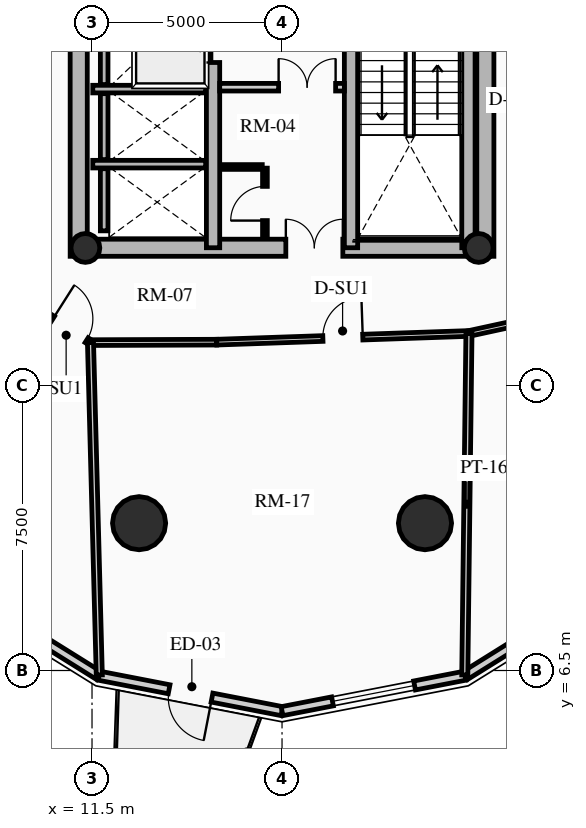
"""IFC4 building model, lengths in metres.
Left out: names, types, materials, properties, quantities, classifications, styles, units other than length and angle.
Written with IfcOpenShell. Run it as: python <this file> out.ifc"""

import sys

from ifc_helpers import new_model, si_unit, direction, frame, frame_2d, origin, origin_2d, place, context, subcontext, project, spatial, rectangle, circle, hollow_circle, extrude, source, transform, mapped, element, fill, save


model = new_model("IFC4")
c1 = context("Model", 3, precision=1e-05, world=origin(), true_north=direction((0.0, 1.0)))
c2 = subcontext(c1, "Body", "Model", "MODEL_VIEW")
j1 = project(units=[si_unit("LENGTHUNIT", "METRE"), si_unit("PLANEANGLEUNIT", "RADIAN")], contexts=[c1])
p1 = place(None, origin())
s1 = spatial("IfcSite", under=j1, at=p1, CompositionType="ELEMENT")
p2 = place(p1, origin())
s2 = spatial("IfcBuilding", under=s1, at=p2, CompositionType="ELEMENT")
p3 = place(p2, frame((0.0, 0.0, 78.88)))
s3 = spatial("IfcBuildingStorey", under=s2, at=p3, CompositionType="ELEMENT", Elevation=78.88)
for number, where, z_axis, x_axis in (
    (1, (11.15, 17.4, 0.0), (0.0, 0.0, 1.0), (0.0, 1.0, 0.0)),
    (2, (21.85, 17.4, 0.0), (0.0, 0.0, 1.0), (0.0, 1.0, 0.0)),
):
    element("IfcWall", number, at=place(p3, frame(where, z_axis=z_axis, x_axis=x_axis)), inside=s3, PredefinedType="SHEAR", context=c2, shape_type="SweptSolid", body=[
        extrude(rectangle(XDim=14.2, YDim=0.45, at=frame_2d((7.1, 0.0))), origin(), (0.0, 0.0, 1.0), 2.91),
    ])
p4 = place(p3, frame((11.15, 17.625, 0.0), z_axis=(0.0, 0.0, 1.0), x_axis=(1.0, 0.0, 0.0)))
e3 = element("IfcWall", 3, at=p4, inside=s3, PredefinedType="SHEAR", context=c2, shape_type="SweptSolid", body=[
    extrude(rectangle(XDim=10.7, YDim=0.45, at=frame_2d((5.35, 0.0))), origin(), (0.0, 0.0, 1.0), 2.91),
])
m1 = source(origin(), c2, "Body", "SweptSolid", [
    extrude(rectangle(XDim=1.5, YDim=2.02, at=frame_2d((0.75, 1.01))), frame((0.0, 0.235, 0.0), z_axis=(0.0, -1.0, 0.0), x_axis=(1.0, 0.0, 0.0)), (0.0, 0.0, 1.0), 0.47),
])
p5 = place(p4, frame((5.45, 0.0, 0.0)))
e4 = element("IfcOpeningElement", 4, at=p5, cuts=e3, PredefinedType="OPENING", context=c2, shape_type="MappedRepresentation", body=[
    mapped(m1, transform((0.0, 0.0, 0.0), x_axis=(1.0, 0.0, 0.0), y_axis=(0.0, 1.0, 0.0), z_axis=(0.0, 0.0, 1.0), scale=1.0)),
])
p6 = place(p3, frame((14.685, 17.625, 0.0), z_axis=(0.0, 0.0, 1.0), x_axis=(0.0, 1.0, 0.0)))
e5 = element("IfcWall", 5, at=p6, inside=s3, PredefinedType="SHEAR", context=c2, shape_type="SweptSolid", body=[
    extrude(rectangle(XDim=13.75, YDim=0.35, at=frame_2d((6.875, 0.0))), origin(), (0.0, 0.0, 1.0), 2.91),
])
m2 = source(origin(), c2, "Body", "SweptSolid", [
    extrude(rectangle(XDim=1.1, YDim=2.015, at=frame_2d((0.55, 1.007))), frame((0.0, 0.185, 0.0), z_axis=(0.0, -1.0, 0.0), x_axis=(1.0, 0.0, 0.0)), (0.0, 0.0, 1.0), 0.37),
])
p7 = place(p6, frame((4.875, 0.0, 0.0)))
e6 = element("IfcOpeningElement", 6, at=p7, cuts=e5, PredefinedType="OPENING", context=c2, shape_type="MappedRepresentation", body=[
    mapped(m2, transform((0.0, 0.0, 0.0), x_axis=(1.0, 0.0, 0.0), y_axis=(0.0, 1.0, 0.0), z_axis=(0.0, 0.0, 1.0), scale=1.0)),
])
m3 = source(origin(), c2, "Body", "SweptSolid", [
    extrude(rectangle(XDim=1.15, YDim=2.02, at=frame_2d((0.575, 1.01))), frame((0.0, 0.185, 0.0), z_axis=(0.0, -1.0, 0.0), x_axis=(1.0, 0.0, 0.0)), (0.0, 0.0, 1.0), 0.37),
])
p8 = place(p6, frame((7.295, 0.0, 0.0)))
e7 = element("IfcOpeningElement", 7, at=p8, cuts=e5, PredefinedType="OPENING", context=c2, shape_type="MappedRepresentation", body=[
    mapped(m3, transform((0.0, 0.0, 0.0), x_axis=(1.0, 0.0, 0.0), y_axis=(0.0, 1.0, 0.0), z_axis=(0.0, 0.0, 1.0), scale=1.0)),
])
p9 = place(p3, frame((18.315, 17.625, 0.0), z_axis=(0.0, 0.0, 1.0), x_axis=(0.0, 1.0, 0.0)))
e8 = element("IfcWall", 8, at=p9, inside=s3, PredefinedType="SHEAR", context=c2, shape_type="SweptSolid", body=[
    extrude(rectangle(XDim=13.75, YDim=0.35, at=frame_2d((6.875, 0.0))), origin(), (0.0, 0.0, 1.0), 2.91),
])
p10 = place(p9, frame((10.0, 0.0, 0.0)))
e9 = element("IfcOpeningElement", 9, at=p10, cuts=e8, PredefinedType="OPENING", context=c2, shape_type="MappedRepresentation", body=[
    mapped(m2, transform((0.0, 0.0, 0.0), x_axis=(1.0, 0.0, 0.0), y_axis=(0.0, 1.0, 0.0), z_axis=(0.0, 0.0, 1.0), scale=1.0)),
])
p11 = place(p9, frame((12.0, 0.0, 0.0)))
e10 = element("IfcOpeningElement", 10, at=p11, cuts=e8, PredefinedType="OPENING", context=c2, shape_type="MappedRepresentation", body=[
    mapped(m2, transform((0.0, 0.0, 0.0), x_axis=(1.0, 0.0, 0.0), y_axis=(0.0, 1.0, 0.0), z_axis=(0.0, 0.0, 1.0), scale=1.0)),
])
p12 = place(p9, frame((5.305, 0.0, 0.0)))
e11 = element("IfcOpeningElement", 11, at=p12, cuts=e8, PredefinedType="OPENING", context=c2, shape_type="MappedRepresentation", body=[
    mapped(m3, transform((0.0, 0.0, 0.0), x_axis=(1.0, 0.0, 0.0), y_axis=(0.0, 1.0, 0.0), z_axis=(0.0, 0.0, 1.0), scale=1.0)),
])
p13 = place(p3, frame((21.405, 17.625, 0.0), z_axis=(0.0, 0.0, 1.0), x_axis=(0.0, 1.0, 0.0)))
e12 = element("IfcWall", 12, at=p13, inside=s3, PredefinedType="SHEAR", context=c2, shape_type="SweptSolid", body=[
    extrude(rectangle(XDim=6.72, YDim=0.35, at=frame_2d((3.36, 0.0))), origin(), (0.0, 0.0, 1.0), 2.91),
])
for number, where, z_axis, x_axis in (
    (13, (11.325, 17.62, 0.0), (0.0, 0.0, 1.0), (1.0, 0.0, 0.0)),
    (14, (21.675, 17.62, 0.0), (0.0, 0.0, 1.0), (1.0, 0.0, 0.0)),
):
    element("IfcColumn", number, at=place(p3, frame(where, z_axis=z_axis, x_axis=x_axis)), inside=s3, PredefinedType="COLUMN", context=c2, shape_type="SweptSolid", body=[
        extrude(hollow_circle(Radius=0.38, WallThickness=0.032, at=origin_2d()), origin(), (0.0, 0.0, 1.0), 2.91),
    ])
for number, where, z_axis, x_axis in (
    (15, (12.739, 10.377, 0.0), (0.0, 0.0, 1.0), (1.0, 0.0, 0.0)),
    (16, (20.261, 10.377, 0.0), (0.0, 0.0, 1.0), (1.0, 0.0, 0.0)),
):
    element("IfcColumn", number, at=place(p3, frame(where, z_axis=z_axis, x_axis=x_axis)), inside=s3, PredefinedType="USERDEFINED", context=c2, shape_type="SweptSolid", body=[
        extrude(circle(Radius=0.7, at=origin_2d()), origin(), (0.0, 0.0, 1.0), 2.91),
    ])
p14 = place(p3, frame((11.685, 6.363, 0.0), z_axis=(0.0, 0.0, 1.0), x_axis=(-0.848520380187, 0.529162701263, 0.0)))
e17 = element("IfcWall", 17, at=p14, inside=s3, PredefinedType="SOLIDWALL", context=c2, shape_type="SweptSolid", body=[
    extrude(rectangle(XDim=5.119, YDim=0.24, at=frame_2d((2.56, 0.0))), origin(), (0.0, 0.0, 1.0), 2.179),
])
m4 = source(origin(), c2, "Body", "SweptSolid", [
    extrude(rectangle(XDim=1.9, YDim=1.35, at=frame_2d((0.95, 0.675))), frame((0.0, 0.13, 0.0), z_axis=(0.0, -1.0, 0.0), x_axis=(1.0, 0.0, 0.0)), (0.0, 0.0, 1.0), 0.26),
])
p15 = place(p14, frame((1.609, 0.0, 0.65)))
e18 = element("IfcOpeningElement", 18, at=p15, cuts=e17, PredefinedType="OPENING", context=c2, shape_type="MappedRepresentation", body=[
    mapped(m4, transform((0.0, 0.0, 0.0), x_axis=(1.0, 0.0, 0.0), y_axis=(0.0, 1.0, 0.0), z_axis=(0.0, 0.0, 1.0), scale=1.0)),
])
p16 = place(p3, frame((16.5, 5.43, 0.0), z_axis=(0.0, 0.0, 1.0), x_axis=(-0.981723785992, 0.190311344954, 0.0)))
e19 = element("IfcWall", 19, at=p16, inside=s3, PredefinedType="SOLIDWALL", context=c2, shape_type="SweptSolid", body=[
    extrude(rectangle(XDim=4.904, YDim=0.24, at=frame_2d((2.452, 0.0))), origin(), (0.0, 0.0, 1.0), 2.179),
])
m5 = source(origin(), c2, "Body", "SweptSolid", [
    extrude(rectangle(XDim=1.15, YDim=2.005, at=frame_2d((0.575, 1.002))), frame((0.0, 0.13, 0.0), z_axis=(0.0, -1.0, 0.0), x_axis=(1.0, 0.0, 0.0)), (0.0, 0.0, 1.0), 0.26),
])
p17 = place(p16, frame((1.877, 0.0, 0.0)))
e20 = element("IfcOpeningElement", 20, at=p17, cuts=e19, PredefinedType="OPENING", context=c2, shape_type="MappedRepresentation", body=[
    mapped(m5, transform((0.0, 0.0, 0.0), x_axis=(1.0, 0.0, 0.0), y_axis=(0.0, 1.0, 0.0), z_axis=(0.0, 0.0, 1.0), scale=1.0)),
])
p18 = place(p3, frame((21.315, 6.363, 0.0), z_axis=(0.0, 0.0, 1.0), x_axis=(-0.981723785992, -0.190311344954, 0.0)))
e21 = element("IfcWall", 21, at=p18, inside=s3, PredefinedType="SOLIDWALL", context=c2, shape_type="SweptSolid", body=[
    extrude(rectangle(XDim=4.904, YDim=0.24, at=frame_2d((2.452, 0.0))), origin(), (0.0, 0.0, 1.0), 2.179),
])
m6 = source(origin(), c2, "Body", "SweptSolid", [
    extrude(rectangle(XDim=2.2, YDim=1.35, at=frame_2d((1.1, 0.675))), frame((0.0, 0.13, 0.0), z_axis=(0.0, -1.0, 0.0), x_axis=(1.0, 0.0, 0.0)), (0.0, 0.0, 1.0), 0.26),
])
p19 = place(p18, frame((1.352, 0.0, 0.65)))
e22 = element("IfcOpeningElement", 22, at=p19, cuts=e21, PredefinedType="OPENING", context=c2, shape_type="MappedRepresentation", body=[
    mapped(m6, transform((0.0, 0.0, 0.0), x_axis=(1.0, 0.0, 0.0), y_axis=(0.0, 1.0, 0.0), z_axis=(0.0, 0.0, 1.0), scale=1.0)),
])
p20 = place(p3, frame((25.658, 9.072, 0.0), z_axis=(0.0, 0.0, 1.0), x_axis=(-0.848520380187, -0.529162701263, 0.0)))
e23 = element("IfcWall", 23, at=p20, inside=s3, PredefinedType="SOLIDWALL", context=c2, shape_type="SweptSolid", body=[
    extrude(rectangle(XDim=5.119, YDim=0.24, at=frame_2d((2.56, 0.0))), origin(), (0.0, 0.0, 1.0), 2.179),
])
p21 = place(p3, frame((11.52, 21.8, 0.0), z_axis=(0.0, 0.0, 1.0), x_axis=(1.0, 0.0, 0.0)))
e24 = element("IfcWall", 24, at=p21, inside=s3, PredefinedType="SHEAR", context=c2, shape_type="SweptSolid", body=[
    extrude(rectangle(XDim=2.97, YDim=0.2, at=frame_2d((1.485, 0.0))), origin(), (0.0, 0.0, 1.0), 2.91),
])
p22 = place(p3, frame((11.82, 21.92, 0.0), z_axis=(0.0, 0.0, 1.0), x_axis=(0.0, 1.0, 0.0)))
e25 = element("IfcWall", 25, at=p22, inside=s3, PredefinedType="SHEAR", context=c2, shape_type="SweptSolid", body=[
    extrude(rectangle(XDim=2.44, YDim=0.2, at=frame_2d((1.22, 0.0))), origin(), (0.0, 0.0, 1.0), 2.91),
])
p23 = place(p3, frame((11.52, 19.825, 0.0), z_axis=(0.0, 0.0, 1.0), x_axis=(1.0, 0.0, 0.0)))
e26 = element("IfcWall", 26, at=p23, inside=s3, PredefinedType="SHEAR", context=c2, shape_type="SweptSolid", body=[
    extrude(rectangle(XDim=2.97, YDim=0.2, at=frame_2d((1.485, 0.0))), origin(), (0.0, 0.0, 1.0), 2.91),
])
p24 = place(p3, frame((11.82, 19.945, 0.0), z_axis=(0.0, 0.0, 1.0), x_axis=(0.0, 1.0, 0.0)))
e27 = element("IfcWall", 27, at=p24, inside=s3, PredefinedType="SHEAR", context=c2, shape_type="SweptSolid", body=[
    extrude(rectangle(XDim=1.735, YDim=0.2, at=frame_2d((0.867, 0.0))), origin(), (0.0, 0.0, 1.0), 2.91),
])
p25 = place(p3, frame((11.82, 18.07, 0.0), z_axis=(0.0, 0.0, 1.0), x_axis=(0.0, 1.0, 0.0)))
e28 = element("IfcWall", 28, at=p25, inside=s3, PredefinedType="SHEAR", context=c2, shape_type="SweptSolid", body=[
    extrude(rectangle(XDim=1.635, YDim=0.2, at=frame_2d((0.817, 0.0))), origin(), (0.0, 0.0, 1.0), 2.91),
])
p26 = place(p3, frame((14.86, 21.85, 0.0), z_axis=(0.0, 0.0, 1.0), x_axis=(1.0, 0.0, 0.0)))
e29 = element("IfcWall", 29, at=p26, inside=s3, PredefinedType="PARTITIONING", context=c2, shape_type="SweptSolid", body=[
    extrude(rectangle(XDim=3.28, YDim=0.2, at=frame_2d((1.64, 0.0))), origin(), (0.0, 0.0, 1.0), 2.655),
])
m7 = source(origin(), c2, "Body", "SweptSolid", [
    extrude(rectangle(XDim=1.5, YDim=2.02, at=frame_2d((0.75, 1.01))), frame((0.0, 0.11, 0.0), z_axis=(0.0, -1.0, 0.0), x_axis=(1.0, 0.0, 0.0)), (0.0, 0.0, 1.0), 0.22),
])
p27 = place(p26, frame((1.55, 0.0, 0.0)))
e30 = element("IfcOpeningElement", 30, at=p27, cuts=e29, PredefinedType="OPENING", context=c2, shape_type="MappedRepresentation", body=[
    mapped(m7, transform((0.0, 0.0, 0.0), x_axis=(1.0, 0.0, 0.0), y_axis=(0.0, 1.0, 0.0), z_axis=(0.0, 0.0, 1.0), scale=1.0)),
])
p28 = place(p3, frame((16.05, 17.92, 0.0), z_axis=(0.0, 0.0, 1.0), x_axis=(0.0, 1.0, 0.0)))
e31 = element("IfcWall", 31, at=p28, inside=s3, PredefinedType="PARTITIONING", context=c2, shape_type="SweptSolid", body=[
    extrude(rectangle(XDim=1.8, YDim=0.125, at=frame_2d((0.9, 0.0))), origin(), (0.0, 0.0, 1.0), 2.655),
])
m8 = source(origin(), c2, "Body", "SweptSolid", [
    extrude(rectangle(XDim=0.9, YDim=2.005, at=frame_2d((0.45, 1.002))), frame((0.0, 0.073, 0.0), z_axis=(0.0, -1.0, 0.0), x_axis=(1.0, 0.0, 0.0)), (0.0, 0.0, 1.0), 0.145),
])
p29 = place(p28, frame((0.42, 0.0, 0.0)))
e32 = element("IfcOpeningElement", 32, at=p29, cuts=e31, PredefinedType="OPENING", context=c2, shape_type="MappedRepresentation", body=[
    mapped(m8, transform((0.0, 0.0, 0.0), x_axis=(1.0, 0.0, 0.0), y_axis=(0.0, 1.0, 0.0), z_axis=(0.0, 0.0, 1.0), scale=1.0)),
])
p30 = place(p3, frame((14.88, 19.75, 0.0), z_axis=(0.0, 0.0, 1.0), x_axis=(1.0, 0.0, 0.0)))
e33 = element("IfcWall", 33, at=p30, inside=s3, PredefinedType="PARTITIONING", context=c2, shape_type="SweptSolid", body=[
    extrude(rectangle(XDim=1.1, YDim=0.125, at=frame_2d((0.55, 0.0))), origin(), (0.0, 0.0, 1.0), 2.655),
])
p31 = place(p3, frame((10.115, 15.983, 0.0), z_axis=(0.0, 0.0, 1.0), x_axis=(0.843995849351, -0.536349705209, 0.0)))
e34 = element("IfcWall", 34, at=p31, inside=s3, PredefinedType="PARTITIONING", context=c2, shape_type="SweptSolid", body=[
    extrude(rectangle(XDim=1.593, YDim=0.15, at=frame_2d((0.796, 0.0))), origin(), (0.0, 0.0, 1.0), 2.225),
])
m9 = source(origin(), c2, "Body", "SweptSolid", [
    extrude(rectangle(XDim=1.05, YDim=2.015, at=frame_2d((0.525, 1.007))), frame((0.0, 0.085, 0.0), z_axis=(0.0, -1.0, 0.0), x_axis=(1.0, 0.0, 0.0)), (0.0, 0.0, 1.0), 0.17),
])
p32 = place(p31, frame((0.423, 0.0, 0.0)))
e35 = element("IfcOpeningElement", 35, at=p32, cuts=e34, PredefinedType="OPENING", context=c2, shape_type="MappedRepresentation", body=[
    mapped(m9, transform((0.0, 0.0, 0.0), x_axis=(1.0, 0.0, 0.0), y_axis=(0.0, 1.0, 0.0), z_axis=(0.0, 0.0, 1.0), scale=1.0)),
])
p33 = place(p3, frame((11.46, 15.129, 0.0), z_axis=(0.0, 0.0, 1.0), x_axis=(0.999993513287, 0.003601858435, 0.0)))
e36 = element("IfcWall", 36, at=p33, inside=s3, PredefinedType="PARTITIONING", context=c2, shape_type="SweptSolid", body=[
    extrude(rectangle(XDim=3.321, YDim=0.15, at=frame_2d((1.661, 0.0))), origin(), (0.0, 0.0, 1.0), 2.225),
])
p34 = place(p3, frame((14.781, 15.141, 0.0), z_axis=(0.0, 0.0, 1.0), x_axis=(0.999407918707, 0.034406569513, 0.0)))
e37 = element("IfcWall", 37, at=p34, inside=s3, PredefinedType="PARTITIONING", context=c2, shape_type="SweptSolid", body=[
    extrude(rectangle(XDim=6.642, YDim=0.15, at=frame_2d((3.321, 0.0))), origin(), (0.0, 0.0, 1.0), 2.225),
])
p35 = place(p34, frame((2.796, 0.0, 0.0)))
e38 = element("IfcOpeningElement", 38, at=p35, cuts=e37, PredefinedType="OPENING", context=c2, shape_type="MappedRepresentation", body=[
    mapped(m9, transform((0.0, 0.0, 0.0), x_axis=(1.0, 0.0, 0.0), y_axis=(0.0, 1.0, 0.0), z_axis=(0.0, 0.0, 1.0), scale=1.0)),
])
p36 = place(p3, frame((21.419, 15.369, 0.0), z_axis=(0.0, 0.0, 1.0), x_axis=(0.977192701953, 0.212354475464, 0.0)))
e39 = element("IfcWall", 39, at=p36, inside=s3, PredefinedType="PARTITIONING", context=c2, shape_type="SweptSolid", body=[
    extrude(rectangle(XDim=1.888, YDim=0.15, at=frame_2d((0.944, 0.0))), origin(), (0.0, 0.0, 1.0), 2.225),
])
p37 = place(p3, frame((11.46, 15.129, 0.0), z_axis=(0.0, 0.0, 1.0), x_axis=(0.026480592098, -0.999649327636, 0.0)))
e40 = element("IfcWall", 40, at=p37, inside=s3, PredefinedType="PARTITIONING", context=c2, shape_type="SweptSolid", body=[
    extrude(rectangle(XDim=8.75, YDim=0.16, at=frame_2d((4.375, 0.0))), origin(), (0.0, 0.0, 1.0), 2.179),
])
p38 = place(p3, frame((21.419, 15.369, 0.0), z_axis=(0.0, 0.0, 1.0), x_axis=(-0.012251185903, -0.999924951406, 0.0)))
e41 = element("IfcWall", 41, at=p38, inside=s3, PredefinedType="PARTITIONING", context=c2, shape_type="SweptSolid", body=[
    extrude(rectangle(XDim=8.988, YDim=0.16, at=frame_2d((4.494, 0.0))), origin(), (0.0, 0.0, 1.0), 2.179),
])
m10 = source(origin(), c2, "Body", "SweptSolid", [
    extrude(rectangle(XDim=1.15, YDim=2.005, at=frame_2d((0.575, 1.002))), frame((0.0, 0.025, 0.0), z_axis=(0.0, -1.0, 0.0), x_axis=(1.0, 0.0, 0.0)), (0.0, 0.0, 1.0), 0.05),
])
p39 = place(p17, origin())
e42 = element("IfcDoor", 42, at=p39, inside=s3, OperationType="SINGLE_SWING_LEFT", PredefinedType="DOOR", context=c2, shape_type="MappedRepresentation", body=[
    mapped(m10, transform((0.0, 0.0, 0.0), x_axis=(1.0, 0.0, 0.0), y_axis=(0.0, 1.0, 0.0), z_axis=(0.0, 0.0, 1.0), scale=1.0)),
])
fill(e20, e42)
m11 = source(origin(), c2, "Body", "SweptSolid", [
    extrude(rectangle(XDim=2.2, YDim=1.35, at=frame_2d((1.1, 0.675))), frame((0.0, 0.03, 0.0), z_axis=(0.0, -1.0, 0.0), x_axis=(1.0, 0.0, 0.0)), (0.0, 0.0, 1.0), 0.06),
])
p40 = place(p19, origin())
e43 = element("IfcWindow", 43, at=p40, inside=s3, PartitioningType="DOUBLE_PANEL_VERTICAL", PredefinedType="WINDOW", context=c2, shape_type="MappedRepresentation", body=[
    mapped(m11, transform((0.0, 0.0, 0.0), x_axis=(1.0, 0.0, 0.0), y_axis=(0.0, 1.0, 0.0), z_axis=(0.0, 0.0, 1.0), scale=1.0)),
])
fill(e22, e43)
m12 = source(origin(), c2, "Body", "SweptSolid", [
    extrude(rectangle(XDim=1.1, YDim=2.015, at=frame_2d((0.55, 1.007))), frame((0.0, 0.025, 0.0), z_axis=(0.0, -1.0, 0.0), x_axis=(1.0, 0.0, 0.0)), (0.0, 0.0, 1.0), 0.05),
])
p41 = place(p7, origin())
e44 = element("IfcDoor", 44, at=p41, inside=s3, OperationType="SLIDING_TO_LEFT", PredefinedType="DOOR", context=c2, shape_type="MappedRepresentation", body=[
    mapped(m12, transform((0.0, 0.0, 0.0), x_axis=(1.0, 0.0, 0.0), y_axis=(0.0, 1.0, 0.0), z_axis=(0.0, 0.0, 1.0), scale=1.0)),
])
fill(e6, e44)
m13 = source(origin(), c2, "Body", "SweptSolid", [
    extrude(rectangle(XDim=1.5, YDim=2.02, at=frame_2d((0.75, 1.01))), frame((0.0, 0.025, 0.0), z_axis=(0.0, -1.0, 0.0), x_axis=(1.0, 0.0, 0.0)), (0.0, 0.0, 1.0), 0.05),
])
p42 = place(p5, origin())
e45 = element("IfcDoor", 45, at=p42, inside=s3, OperationType="DOUBLE_DOOR_SINGLE_SWING", PredefinedType="DOOR", context=c2, shape_type="MappedRepresentation", body=[
    mapped(m13, transform((0.0, 0.0, 0.0), x_axis=(1.0, 0.0, 0.0), y_axis=(0.0, 1.0, 0.0), z_axis=(0.0, 0.0, 1.0), scale=1.0)),
])
fill(e4, e45)
p43 = place(p27, origin())
e46 = element("IfcDoor", 46, at=p43, inside=s3, OperationType="DOUBLE_DOOR_SINGLE_SWING", PredefinedType="DOOR", context=c2, shape_type="MappedRepresentation", body=[
    mapped(m13, transform((0.0, 0.0, 0.0), x_axis=(1.0, 0.0, 0.0), y_axis=(0.0, 1.0, 0.0), z_axis=(0.0, 0.0, 1.0), scale=1.0)),
])
fill(e30, e46)
m14 = source(origin(), c2, "Body", "SweptSolid", [
    extrude(rectangle(XDim=0.9, YDim=2.005, at=frame_2d((0.45, 1.002))), frame((0.0, 0.025, 0.0), z_axis=(0.0, -1.0, 0.0), x_axis=(1.0, 0.0, 0.0)), (0.0, 0.0, 1.0), 0.05),
])
p44 = place(p29, origin())
e47 = element("IfcDoor", 47, at=p44, inside=s3, OperationType="SINGLE_SWING_LEFT", PredefinedType="DOOR", context=c2, shape_type="MappedRepresentation", body=[
    mapped(m14, transform((0.0, 0.0, 0.0), x_axis=(1.0, 0.0, 0.0), y_axis=(0.0, 1.0, 0.0), z_axis=(0.0, 0.0, 1.0), scale=1.0)),
])
fill(e32, e47)
m15 = source(origin(), c2, "Body", "SweptSolid", [
    extrude(rectangle(XDim=1.05, YDim=2.015, at=frame_2d((0.525, 1.007))), frame((0.0, 0.025, 0.0), z_axis=(0.0, -1.0, 0.0), x_axis=(1.0, 0.0, 0.0)), (0.0, 0.0, 1.0), 0.05),
])
p45 = place(p32, origin())
e48 = element("IfcDoor", 48, at=p45, inside=s3, OperationType="SINGLE_SWING_LEFT", PredefinedType="DOOR", context=c2, shape_type="MappedRepresentation", body=[
    mapped(m15, transform((0.0, 0.0, 0.0), x_axis=(1.0, 0.0, 0.0), y_axis=(0.0, 1.0, 0.0), z_axis=(0.0, 0.0, 1.0), scale=1.0)),
])
fill(e35, e48)
p46 = place(p35, origin())
e49 = element("IfcDoor", 49, at=p46, inside=s3, OperationType="SINGLE_SWING_RIGHT", PredefinedType="DOOR", context=c2, shape_type="MappedRepresentation", body=[
    mapped(m15, transform((0.0, 0.0, 0.0), x_axis=(1.0, 0.0, 0.0), y_axis=(0.0, 1.0, 0.0), z_axis=(0.0, 0.0, 1.0), scale=1.0)),
])
fill(e38, e49)
save(model, sys.argv[1])
